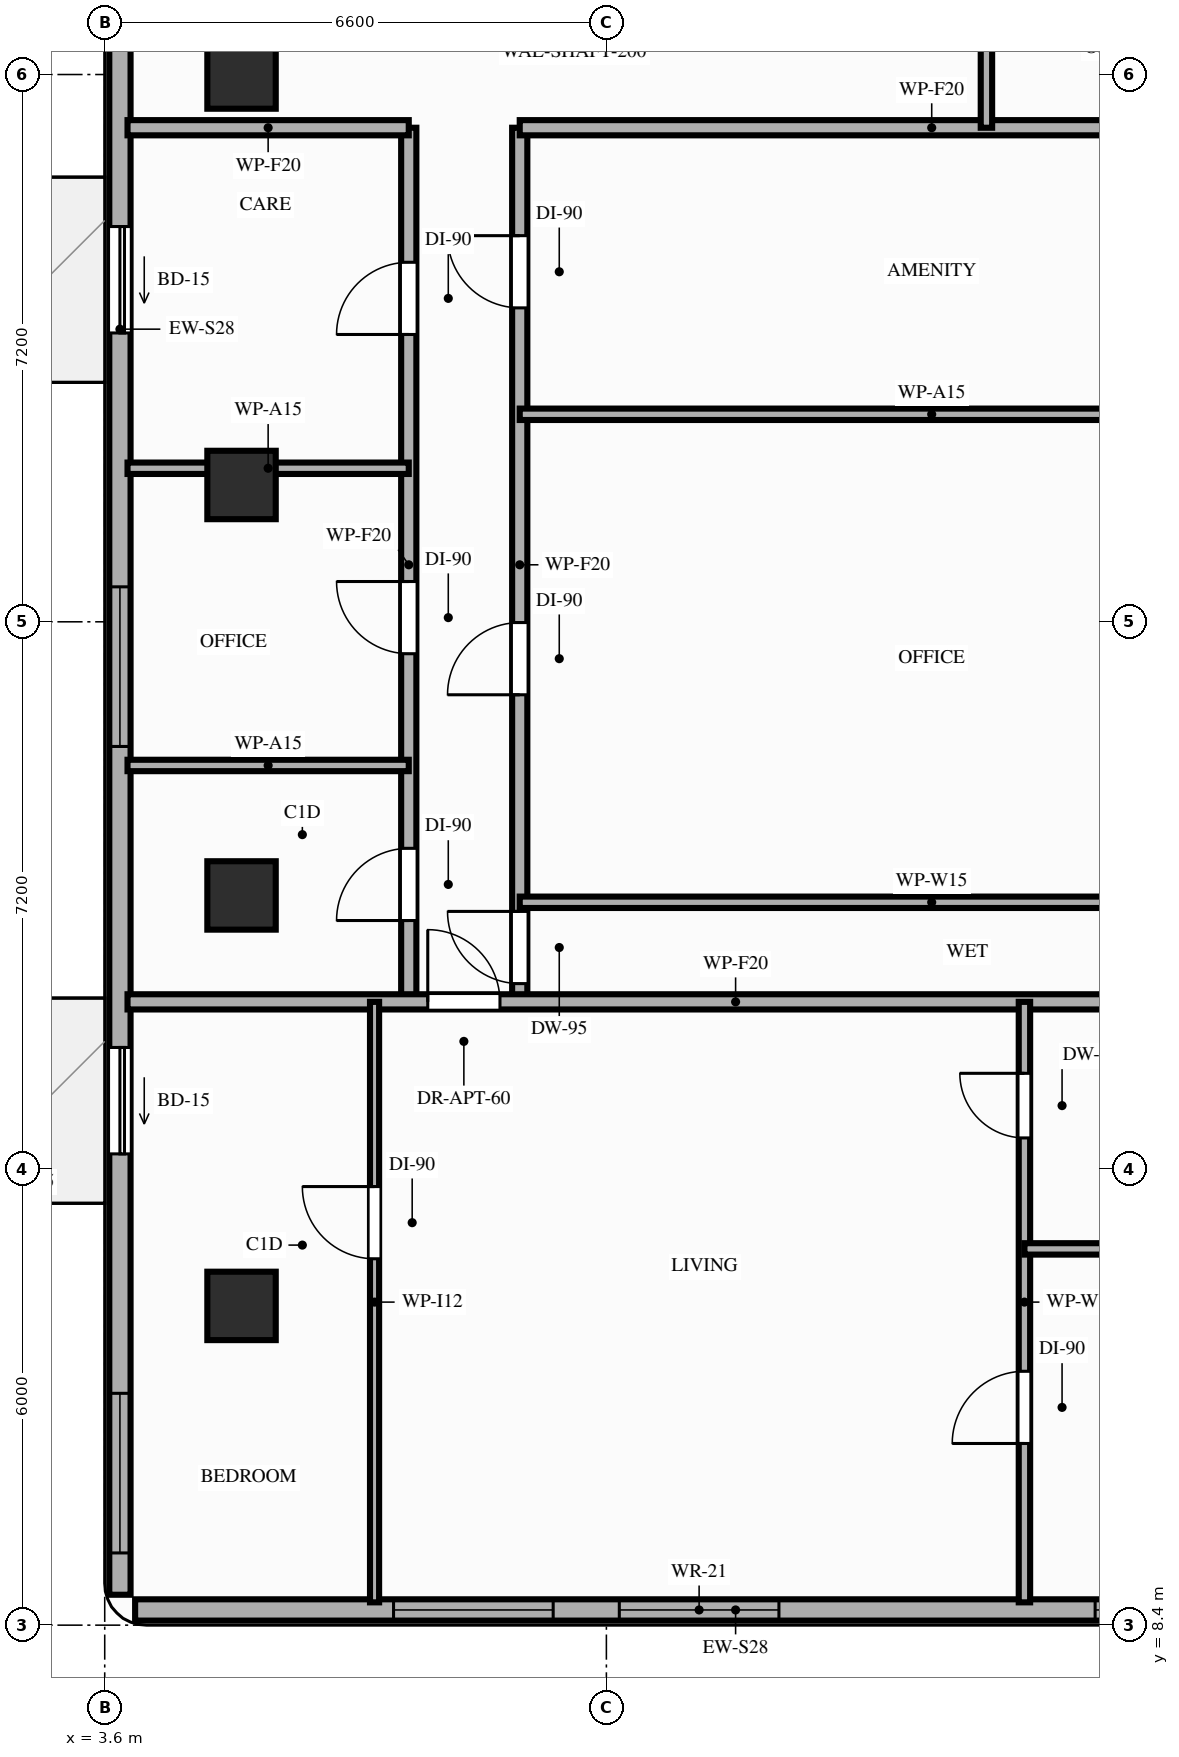
"""IFC4 building model, lengths in metres.
Left out: names, types, materials, properties, quantities, classifications, styles, units other than length and angle.
Written with IfcOpenShell. Run it as: python <this file> out.ifc"""

import sys

from ifc_helpers import new_model, si_unit, direction, frame, frame_2d, origin, origin_2d, place, context, subcontext, project, spatial, rectangle, extrude, element, fill, save


model = new_model("IFC4")
c1 = context("Model", 3, precision=1e-05, world=origin(), true_north=direction((0.0, 1.0)))
c2 = subcontext(c1, "Body", "Model", "MODEL_VIEW")
j1 = project(units=[si_unit("LENGTHUNIT", "METRE"), si_unit("PLANEANGLEUNIT", "RADIAN")], contexts=[c1])
p1 = place(None, origin())
s1 = spatial("IfcSite", under=j1, at=p1, CompositionType="ELEMENT")
p2 = place(p1, origin())
s2 = spatial("IfcBuilding", under=s1, at=p2, CompositionType="ELEMENT")
p3 = place(p2, frame((0.0, 0.0, 204.8)))
s3 = spatial("IfcBuildingStorey", under=s2, at=p3, CompositionType="ELEMENT", Elevation=204.8)
for number, where, z_axis, x_axis in (
    (1, (5.4, 12.6, 0.0), (0.0, 0.0, 1.0), (1.0, 0.0, 0.0)),
    (2, (5.4, 18.0, 0.0), (0.0, 0.0, 1.0), (1.0, 0.0, 0.0)),
    (3, (5.4, 23.4, 0.0), (0.0, 0.0, 1.0), (1.0, 0.0, 0.0)),
    (4, (5.4, 28.8, 0.0), (0.0, 0.0, 1.0), (1.0, 0.0, 0.0)),
):
    element("IfcColumn", number, at=place(p3, frame(where, z_axis=z_axis, x_axis=x_axis)), inside=s3, PredefinedType="COLUMN", context=c2, shape_type="SweptSolid", body=[
        extrude(rectangle(XDim=0.9, YDim=0.9, at=origin_2d()), origin(), (0.0, 0.0, 1.0), 3.2),
    ])
p4 = place(p3, frame((4.0, 8.6, 0.0), z_axis=(0.0, 0.0, 1.0), x_axis=(1.0, 0.0, 0.0)))
e5 = element("IfcWall", 5, at=p4, inside=s3, PredefinedType="STANDARD", context=c2, shape_type="SweptSolid", body=[
    extrude(rectangle(XDim=15.8, YDim=0.28, at=frame_2d((7.9, 0.0))), origin(), (0.0, 0.0, 1.0), 3.02),
])
p5 = place(p4, frame((6.37, 0.0, 0.85)))
e6 = element("IfcOpeningElement", 6, at=p5, cuts=e5, PredefinedType="OPENING", context=c2, shape_type="SweptSolid", body=[
    extrude(rectangle(XDim=2.1, YDim=1.8, at=frame_2d((1.05, 0.9))), frame((0.0, 0.15, 0.0), z_axis=(0.0, -1.0, 0.0), x_axis=(1.0, 0.0, 0.0)), (0.0, 0.0, 1.0), 0.3),
])
p6 = place(p4, frame((12.63, 0.0, 0.85)))
e7 = element("IfcOpeningElement", 7, at=p6, cuts=e5, PredefinedType="OPENING", context=c2, shape_type="SweptSolid", body=[
    extrude(rectangle(XDim=2.1, YDim=1.8, at=frame_2d((1.05, 0.9))), frame((0.0, 0.15, 0.0), z_axis=(0.0, -1.0, 0.0), x_axis=(1.0, 0.0, 0.0)), (0.0, 0.0, 1.0), 0.3),
])
p7 = place(p4, frame((3.4, 0.0, 0.85)))
e8 = element("IfcOpeningElement", 8, at=p7, cuts=e5, PredefinedType="OPENING", context=c2, shape_type="SweptSolid", body=[
    extrude(rectangle(XDim=2.1, YDim=1.8, at=frame_2d((1.05, 0.9))), frame((0.0, 0.15, 0.0), z_axis=(0.0, -1.0, 0.0), x_axis=(1.0, 0.0, 0.0)), (0.0, 0.0, 1.0), 0.3),
])
p8 = place(p3, frame((3.8, 42.1, 0.0), z_axis=(0.0, 0.0, 1.0), x_axis=(0.0, -1.0, 0.0)))
e9 = element("IfcWall", 9, at=p8, inside=s3, PredefinedType="STANDARD", context=c2, shape_type="SweptSolid", body=[
    extrude(rectangle(XDim=33.3, YDim=0.28, at=frame_2d((16.65, 0.0))), origin(), (0.0, 0.0, 1.0), 2.71),
])
p9 = place(p8, frame((26.1, 0.0, 0.0)))
e10 = element("IfcOpeningElement", 10, at=p9, cuts=e9, PredefinedType="OPENING", context=c2, shape_type="SweptSolid", body=[
    extrude(rectangle(XDim=1.4, YDim=2.1, at=frame_2d((0.7, 1.05))), frame((0.0, 0.15, 0.0), z_axis=(0.0, -1.0, 0.0), x_axis=(1.0, 0.0, 0.0)), (0.0, 0.0, 1.0), 0.3),
])
p10 = place(p8, frame((15.3, 0.0, 0.0)))
e11 = element("IfcOpeningElement", 11, at=p10, cuts=e9, PredefinedType="OPENING", context=c2, shape_type="SweptSolid", body=[
    extrude(rectangle(XDim=1.4, YDim=2.1, at=frame_2d((0.7, 1.05))), frame((0.0, 0.15, 0.0), z_axis=(0.0, -1.0, 0.0), x_axis=(1.0, 0.0, 0.0)), (0.0, 0.0, 1.0), 0.3),
])
p11 = place(p8, frame((30.65, 0.0, 0.85)))
e12 = element("IfcOpeningElement", 12, at=p11, cuts=e9, PredefinedType="OPENING", context=c2, shape_type="SweptSolid", body=[
    extrude(rectangle(XDim=2.1, YDim=1.61, at=frame_2d((1.05, 0.805))), frame((0.0, 0.15, 0.0), z_axis=(0.0, -1.0, 0.0), x_axis=(1.0, 0.0, 0.0)), (0.0, 0.0, 1.0), 0.3),
])
p12 = place(p8, frame((20.04, 0.0, 0.85)))
e13 = element("IfcOpeningElement", 13, at=p12, cuts=e9, PredefinedType="OPENING", context=c2, shape_type="SweptSolid", body=[
    extrude(rectangle(XDim=2.1, YDim=1.61, at=frame_2d((1.05, 0.805))), frame((0.0, 0.15, 0.0), z_axis=(0.0, -1.0, 0.0), x_axis=(1.0, 0.0, 0.0)), (0.0, 0.0, 1.0), 0.3),
])
p13 = place(p8, frame((9.75, 0.0, 0.85)))
e14 = element("IfcOpeningElement", 14, at=p13, cuts=e9, PredefinedType="OPENING", context=c2, shape_type="SweptSolid", body=[
    extrude(rectangle(XDim=2.1, YDim=1.61, at=frame_2d((1.05, 0.805))), frame((0.0, 0.15, 0.0), z_axis=(0.0, -1.0, 0.0), x_axis=(1.0, 0.0, 0.0)), (0.0, 0.0, 1.0), 0.3),
])
p14 = place(p8, frame((3.65, 0.0, 0.85)))
e15 = element("IfcOpeningElement", 15, at=p14, cuts=e9, PredefinedType="OPENING", context=c2, shape_type="SweptSolid", body=[
    extrude(rectangle(XDim=2.1, YDim=1.61, at=frame_2d((1.05, 0.805))), frame((0.0, 0.15, 0.0), z_axis=(0.0, -1.0, 0.0), x_axis=(1.0, 0.0, 0.0)), (0.0, 0.0, 1.0), 0.3),
])
p15 = place(p3, frame((7.6, 16.6, 0.0), z_axis=(0.0, 0.0, 1.0), x_axis=(0.0, 1.0, 0.0)))
e16 = element("IfcWall", 16, at=p15, inside=s3, PredefinedType="PARTITIONING", context=c2, shape_type="SweptSolid", body=[
    extrude(rectangle(XDim=11.5, YDim=0.2, at=frame_2d((5.75, 0.0))), origin(), (0.0, 0.0, 1.0), 2.51),
])
p16 = place(p15, frame((1.07, 0.0, 0.0)))
e17 = element("IfcOpeningElement", 17, at=p16, cuts=e16, PredefinedType="OPENING", context=c2, shape_type="SweptSolid", body=[
    extrude(rectangle(XDim=0.95, YDim=2.15, at=frame_2d((0.475, 1.075))), frame((0.0, 0.11, 0.0), z_axis=(0.0, -1.0, 0.0), x_axis=(1.0, 0.0, 0.0)), (0.0, 0.0, 1.0), 0.22),
])
p17 = place(p15, frame((4.58, 0.0, 0.0)))
e18 = element("IfcOpeningElement", 18, at=p17, cuts=e16, PredefinedType="OPENING", context=c2, shape_type="SweptSolid", body=[
    extrude(rectangle(XDim=0.95, YDim=2.15, at=frame_2d((0.475, 1.075))), frame((0.0, 0.11, 0.0), z_axis=(0.0, -1.0, 0.0), x_axis=(1.0, 0.0, 0.0)), (0.0, 0.0, 1.0), 0.22),
])
p18 = place(p15, frame((8.78, 0.0, 0.0)))
e19 = element("IfcOpeningElement", 19, at=p18, cuts=e16, PredefinedType="OPENING", context=c2, shape_type="SweptSolid", body=[
    extrude(rectangle(XDim=0.95, YDim=2.15, at=frame_2d((0.475, 1.075))), frame((0.0, 0.11, 0.0), z_axis=(0.0, -1.0, 0.0), x_axis=(1.0, 0.0, 0.0)), (0.0, 0.0, 1.0), 0.22),
])
p19 = place(p3, frame((9.06, 16.6, 0.0), z_axis=(0.0, 0.0, 1.0), x_axis=(0.0, 1.0, 0.0)))
e20 = element("IfcWall", 20, at=p19, inside=s3, PredefinedType="PARTITIONING", context=c2, shape_type="SweptSolid", body=[
    extrude(rectangle(XDim=11.5, YDim=0.2, at=frame_2d((5.75, 0.0))), origin(), (0.0, 0.0, 1.0), 2.51),
])
p20 = place(p19, frame((0.24, 0.0, 0.0)))
e21 = element("IfcOpeningElement", 21, at=p20, cuts=e20, PredefinedType="OPENING", context=c2, shape_type="SweptSolid", body=[
    extrude(rectangle(XDim=0.95, YDim=2.1, at=frame_2d((0.475, 1.05))), frame((0.0, 0.11, 0.0), z_axis=(0.0, -1.0, 0.0), x_axis=(1.0, 0.0, 0.0)), (0.0, 0.0, 1.0), 0.22),
])
p21 = place(p19, frame((4.04, 0.0, 0.0)))
e22 = element("IfcOpeningElement", 22, at=p21, cuts=e20, PredefinedType="OPENING", context=c2, shape_type="SweptSolid", body=[
    extrude(rectangle(XDim=0.95, YDim=2.15, at=frame_2d((0.475, 1.075))), frame((0.0, 0.11, 0.0), z_axis=(0.0, -1.0, 0.0), x_axis=(1.0, 0.0, 0.0)), (0.0, 0.0, 1.0), 0.22),
])
p22 = place(p19, frame((9.13, 0.0, 0.0)))
e23 = element("IfcOpeningElement", 23, at=p22, cuts=e20, PredefinedType="OPENING", context=c2, shape_type="SweptSolid", body=[
    extrude(rectangle(XDim=0.95, YDim=2.15, at=frame_2d((0.475, 1.075))), frame((0.0, 0.11, 0.0), z_axis=(0.0, -1.0, 0.0), x_axis=(1.0, 0.0, 0.0)), (0.0, 0.0, 1.0), 0.22),
])
p23 = place(p3, frame((3.9, 16.6, 0.0), z_axis=(0.0, 0.0, 1.0), x_axis=(1.0, 0.0, 0.0)))
e24 = element("IfcWall", 24, at=p23, inside=s3, PredefinedType="PARTITIONING", context=c2, shape_type="SweptSolid", body=[
    extrude(rectangle(XDim=16.0, YDim=0.2, at=frame_2d((8.0, 0.0))), origin(), (0.0, 0.0, 1.0), 2.51),
])
p24 = place(p23, frame((3.95, 0.0, 0.0)))
e25 = element("IfcOpeningElement", 25, at=p24, cuts=e24, PredefinedType="OPENING", context=c2, shape_type="SweptSolid", body=[
    extrude(rectangle(XDim=0.95, YDim=2.15, at=frame_2d((0.475, 1.075))), frame((0.0, 0.11, 0.0), z_axis=(0.0, -1.0, 0.0), x_axis=(1.0, 0.0, 0.0)), (0.0, 0.0, 1.0), 0.22),
])
p25 = place(p3, frame((3.9, 28.1, 0.0), z_axis=(0.0, 0.0, 1.0), x_axis=(1.0, 0.0, 0.0)))
e26 = element("IfcWall", 26, at=p25, inside=s3, PredefinedType="PARTITIONING", context=c2, shape_type="SweptSolid", body=[
    extrude(rectangle(XDim=3.7, YDim=0.2, at=frame_2d((1.85, 0.0))), origin(), (0.0, 0.0, 1.0), 2.51),
])
p26 = place(p3, frame((9.06, 28.1, 0.0), z_axis=(0.0, 0.0, 1.0), x_axis=(1.0, 0.0, 0.0)))
e27 = element("IfcWall", 27, at=p26, inside=s3, PredefinedType="PARTITIONING", context=c2, shape_type="SweptSolid", body=[
    extrude(rectangle(XDim=10.84, YDim=0.2, at=frame_2d((5.42, 0.0))), origin(), (0.0, 0.0, 1.0), 2.51),
])
p27 = place(p3, frame((15.2, 28.1, 0.0), z_axis=(0.0, 0.0, 1.0), x_axis=(0.0, 1.0, 0.0)))
e28 = element("IfcWall", 28, at=p27, inside=s3, PredefinedType="PARTITIONING", context=c2, shape_type="SweptSolid", body=[
    extrude(rectangle(XDim=3.05, YDim=0.15, at=frame_2d((1.525, 0.0))), origin(), (0.0, 0.0, 1.0), 2.51),
])
p28 = place(p3, frame((7.15, 8.7, 0.0), z_axis=(0.0, 0.0, 1.0), x_axis=(0.0, 1.0, 0.0)))
e29 = element("IfcWall", 29, at=p28, inside=s3, PredefinedType="PARTITIONING", context=c2, shape_type="SweptSolid", body=[
    extrude(rectangle(XDim=7.9, YDim=0.12, at=frame_2d((3.95, 0.0))), origin(), (0.0, 0.0, 1.0), 2.51),
])
p29 = place(p28, frame((4.52, 0.0, 0.0)))
e30 = element("IfcOpeningElement", 30, at=p29, cuts=e29, PredefinedType="OPENING", context=c2, shape_type="SweptSolid", body=[
    extrude(rectangle(XDim=0.95, YDim=2.15, at=frame_2d((0.475, 1.075))), frame((0.0, 0.07, 0.0), z_axis=(0.0, -1.0, 0.0), x_axis=(1.0, 0.0, 0.0)), (0.0, 0.0, 1.0), 0.14),
])
p30 = place(p3, frame((15.7, 8.7, 0.0), z_axis=(0.0, 0.0, 1.0), x_axis=(0.0, 1.0, 0.0)))
e31 = element("IfcWall", 31, at=p30, inside=s3, PredefinedType="PARTITIONING", context=c2, shape_type="SweptSolid", body=[
    extrude(rectangle(XDim=7.9, YDim=0.15, at=frame_2d((3.95, 0.0))), origin(), (0.0, 0.0, 1.0), 2.51),
])
p31 = place(p30, frame((2.09, 0.0, 0.0)))
e32 = element("IfcOpeningElement", 32, at=p31, cuts=e31, PredefinedType="OPENING", context=c2, shape_type="SweptSolid", body=[
    extrude(rectangle(XDim=0.95, YDim=2.15, at=frame_2d((0.475, 1.075))), frame((0.0, 0.085, 0.0), z_axis=(0.0, -1.0, 0.0), x_axis=(1.0, 0.0, 0.0)), (0.0, 0.0, 1.0), 0.17),
])
p32 = place(p30, frame((6.11, 0.0, 0.0)))
e33 = element("IfcOpeningElement", 33, at=p32, cuts=e31, PredefinedType="OPENING", context=c2, shape_type="SweptSolid", body=[
    extrude(rectangle(XDim=0.85, YDim=2.1, at=frame_2d((0.425, 1.05))), frame((0.0, 0.085, 0.0), z_axis=(0.0, -1.0, 0.0), x_axis=(1.0, 0.0, 0.0)), (0.0, 0.0, 1.0), 0.17),
])
p33 = place(p3, frame((15.7, 13.35, 0.0), z_axis=(0.0, 0.0, 1.0), x_axis=(1.0, 0.0, 0.0)))
e34 = element("IfcWall", 34, at=p33, inside=s3, PredefinedType="PARTITIONING", context=c2, shape_type="SweptSolid", body=[
    extrude(rectangle(XDim=4.2, YDim=0.15, at=frame_2d((2.1, 0.0))), origin(), (0.0, 0.0, 1.0), 2.51),
])
for number, where, z_axis, x_axis in (
    (35, (3.9, 19.71, 0.0), (0.0, 0.0, 1.0), (1.0, 0.0, 0.0)),
    (36, (3.9, 23.62, 0.0), (0.0, 0.0, 1.0), (1.0, 0.0, 0.0)),
):
    element("IfcWall", number, at=place(p3, frame(where, z_axis=z_axis, x_axis=x_axis)), inside=s3, PredefinedType="PARTITIONING", context=c2, shape_type="SweptSolid", body=[
        extrude(rectangle(XDim=3.7, YDim=0.15, at=frame_2d((1.85, 0.0))), origin(), (0.0, 0.0, 1.0), 2.51),
    ])
for number, where, z_axis, x_axis in (
    (37, (9.06, 17.91, 0.0), (0.0, 0.0, 1.0), (1.0, 0.0, 0.0)),
    (38, (9.06, 24.33, 0.0), (0.0, 0.0, 1.0), (1.0, 0.0, 0.0)),
):
    element("IfcWall", number, at=place(p3, frame(where, z_axis=z_axis, x_axis=x_axis)), inside=s3, PredefinedType="PARTITIONING", context=c2, shape_type="SweptSolid", body=[
        extrude(rectangle(XDim=10.84, YDim=0.15, at=frame_2d((5.42, 0.0))), origin(), (0.0, 0.0, 1.0), 2.51),
    ])
p34 = place(p9, origin())
e39 = element("IfcDoor", 39, at=p34, inside=s3, OperationType="SLIDING_TO_RIGHT", PredefinedType="DOOR", context=c2, shape_type="SweptSolid", body=[
    extrude(rectangle(XDim=1.4, YDim=2.1, at=frame_2d((0.7, 1.05))), frame((0.0, 0.025, 0.0), z_axis=(0.0, -1.0, 0.0), x_axis=(1.0, 0.0, 0.0)), (0.0, 0.0, 1.0), 0.05),
])
fill(e10, e39)
p35 = place(p10, origin())
e40 = element("IfcDoor", 40, at=p35, inside=s3, OperationType="SLIDING_TO_RIGHT", PredefinedType="DOOR", context=c2, shape_type="SweptSolid", body=[
    extrude(rectangle(XDim=1.4, YDim=2.1, at=frame_2d((0.7, 1.05))), frame((0.0, 0.025, 0.0), z_axis=(0.0, -1.0, 0.0), x_axis=(1.0, 0.0, 0.0)), (0.0, 0.0, 1.0), 0.05),
])
fill(e11, e40)
p36 = place(p5, origin())
e41 = element("IfcWindow", 41, at=p36, inside=s3, PartitioningType="SINGLE_PANEL", PredefinedType="WINDOW", context=c2, shape_type="SweptSolid", body=[
    extrude(rectangle(XDim=2.1, YDim=1.8, at=frame_2d((1.05, 0.9))), frame((0.0, 0.03, 0.0), z_axis=(0.0, -1.0, 0.0), x_axis=(1.0, 0.0, 0.0)), (0.0, 0.0, 1.0), 0.06),
])
fill(e6, e41)
p37 = place(p6, origin())
e42 = element("IfcWindow", 42, at=p37, inside=s3, PartitioningType="SINGLE_PANEL", PredefinedType="WINDOW", context=c2, shape_type="SweptSolid", body=[
    extrude(rectangle(XDim=2.1, YDim=1.8, at=frame_2d((1.05, 0.9))), frame((0.0, 0.03, 0.0), z_axis=(0.0, -1.0, 0.0), x_axis=(1.0, 0.0, 0.0)), (0.0, 0.0, 1.0), 0.06),
])
fill(e7, e42)
p38 = place(p11, origin())
e43 = element("IfcWindow", 43, at=p38, inside=s3, PartitioningType="SINGLE_PANEL", PredefinedType="WINDOW", context=c2, shape_type="SweptSolid", body=[
    extrude(rectangle(XDim=2.1, YDim=1.61, at=frame_2d((1.05, 0.805))), frame((0.0, 0.03, 0.0), z_axis=(0.0, -1.0, 0.0), x_axis=(1.0, 0.0, 0.0)), (0.0, 0.0, 1.0), 0.06),
])
fill(e12, e43)
p39 = place(p12, origin())
e44 = element("IfcWindow", 44, at=p39, inside=s3, PartitioningType="SINGLE_PANEL", PredefinedType="WINDOW", context=c2, shape_type="SweptSolid", body=[
    extrude(rectangle(XDim=2.1, YDim=1.61, at=frame_2d((1.05, 0.805))), frame((0.0, 0.03, 0.0), z_axis=(0.0, -1.0, 0.0), x_axis=(1.0, 0.0, 0.0)), (0.0, 0.0, 1.0), 0.06),
])
fill(e13, e44)
p40 = place(p7, origin())
e45 = element("IfcWindow", 45, at=p40, inside=s3, PartitioningType="SINGLE_PANEL", PredefinedType="WINDOW", context=c2, shape_type="SweptSolid", body=[
    extrude(rectangle(XDim=2.1, YDim=1.8, at=frame_2d((1.05, 0.9))), frame((0.0, 0.03, 0.0), z_axis=(0.0, -1.0, 0.0), x_axis=(1.0, 0.0, 0.0)), (0.0, 0.0, 1.0), 0.06),
])
fill(e8, e45)
p41 = place(p24, origin())
e46 = element("IfcDoor", 46, at=p41, inside=s3, OperationType="SINGLE_SWING_LEFT", PredefinedType="DOOR", context=c2, shape_type="SweptSolid", body=[
    extrude(rectangle(XDim=0.95, YDim=2.15, at=frame_2d((0.475, 1.075))), frame((0.0, 0.025, 0.0), z_axis=(0.0, -1.0, 0.0), x_axis=(1.0, 0.0, 0.0)), (0.0, 0.0, 1.0), 0.05),
])
fill(e25, e46)
p42 = place(p29, origin())
e47 = element("IfcDoor", 47, at=p42, inside=s3, OperationType="SINGLE_SWING_RIGHT", PredefinedType="DOOR", context=c2, shape_type="SweptSolid", body=[
    extrude(rectangle(XDim=0.95, YDim=2.15, at=frame_2d((0.475, 1.075))), frame((0.0, 0.025, 0.0), z_axis=(0.0, -1.0, 0.0), x_axis=(1.0, 0.0, 0.0)), (0.0, 0.0, 1.0), 0.05),
])
fill(e30, e47)
p43 = place(p31, origin())
e48 = element("IfcDoor", 48, at=p43, inside=s3, OperationType="SINGLE_SWING_LEFT", PredefinedType="DOOR", context=c2, shape_type="SweptSolid", body=[
    extrude(rectangle(XDim=0.95, YDim=2.15, at=frame_2d((0.475, 1.075))), frame((0.0, 0.025, 0.0), z_axis=(0.0, -1.0, 0.0), x_axis=(1.0, 0.0, 0.0)), (0.0, 0.0, 1.0), 0.05),
])
fill(e32, e48)
p44 = place(p32, origin())
e49 = element("IfcDoor", 49, at=p44, inside=s3, OperationType="SINGLE_SWING_RIGHT", PredefinedType="DOOR", context=c2, shape_type="SweptSolid", body=[
    extrude(rectangle(XDim=0.85, YDim=2.1, at=frame_2d((0.425, 1.05))), frame((0.0, 0.025, 0.0), z_axis=(0.0, -1.0, 0.0), x_axis=(1.0, 0.0, 0.0)), (0.0, 0.0, 1.0), 0.05),
])
fill(e33, e49)
p45 = place(p16, origin())
e50 = element("IfcDoor", 50, at=p45, inside=s3, OperationType="SINGLE_SWING_LEFT", PredefinedType="DOOR", context=c2, shape_type="SweptSolid", body=[
    extrude(rectangle(XDim=0.95, YDim=2.15, at=frame_2d((0.475, 1.075))), frame((0.0, 0.025, 0.0), z_axis=(0.0, -1.0, 0.0), x_axis=(1.0, 0.0, 0.0)), (0.0, 0.0, 1.0), 0.05),
])
fill(e17, e50)
p46 = place(p17, origin())
e51 = element("IfcDoor", 51, at=p46, inside=s3, OperationType="SINGLE_SWING_RIGHT", PredefinedType="DOOR", context=c2, shape_type="SweptSolid", body=[
    extrude(rectangle(XDim=0.95, YDim=2.15, at=frame_2d((0.475, 1.075))), frame((0.0, 0.025, 0.0), z_axis=(0.0, -1.0, 0.0), x_axis=(1.0, 0.0, 0.0)), (0.0, 0.0, 1.0), 0.05),
])
fill(e18, e51)
p47 = place(p18, origin())
e52 = element("IfcDoor", 52, at=p47, inside=s3, OperationType="SINGLE_SWING_LEFT", PredefinedType="DOOR", context=c2, shape_type="SweptSolid", body=[
    extrude(rectangle(XDim=0.95, YDim=2.15, at=frame_2d((0.475, 1.075))), frame((0.0, 0.025, 0.0), z_axis=(0.0, -1.0, 0.0), x_axis=(1.0, 0.0, 0.0)), (0.0, 0.0, 1.0), 0.05),
])
fill(e19, e52)
p48 = place(p20, origin())
e53 = element("IfcDoor", 53, at=p48, inside=s3, OperationType="SINGLE_SWING_RIGHT", PredefinedType="DOOR", context=c2, shape_type="SweptSolid", body=[
    extrude(rectangle(XDim=0.95, YDim=2.1, at=frame_2d((0.475, 1.05))), frame((0.0, 0.025, 0.0), z_axis=(0.0, -1.0, 0.0), x_axis=(1.0, 0.0, 0.0)), (0.0, 0.0, 1.0), 0.05),
])
fill(e21, e53)
p49 = place(p21, origin())
e54 = element("IfcDoor", 54, at=p49, inside=s3, OperationType="SINGLE_SWING_LEFT", PredefinedType="DOOR", context=c2, shape_type="SweptSolid", body=[
    extrude(rectangle(XDim=0.95, YDim=2.15, at=frame_2d((0.475, 1.075))), frame((0.0, 0.025, 0.0), z_axis=(0.0, -1.0, 0.0), x_axis=(1.0, 0.0, 0.0)), (0.0, 0.0, 1.0), 0.05),
])
fill(e22, e54)
p50 = place(p22, origin())
e55 = element("IfcDoor", 55, at=p50, inside=s3, OperationType="SINGLE_SWING_RIGHT", PredefinedType="DOOR", context=c2, shape_type="SweptSolid", body=[
    extrude(rectangle(XDim=0.95, YDim=2.15, at=frame_2d((0.475, 1.075))), frame((0.0, 0.025, 0.0), z_axis=(0.0, -1.0, 0.0), x_axis=(1.0, 0.0, 0.0)), (0.0, 0.0, 1.0), 0.05),
])
fill(e23, e55)
save(model, sys.argv[1])
